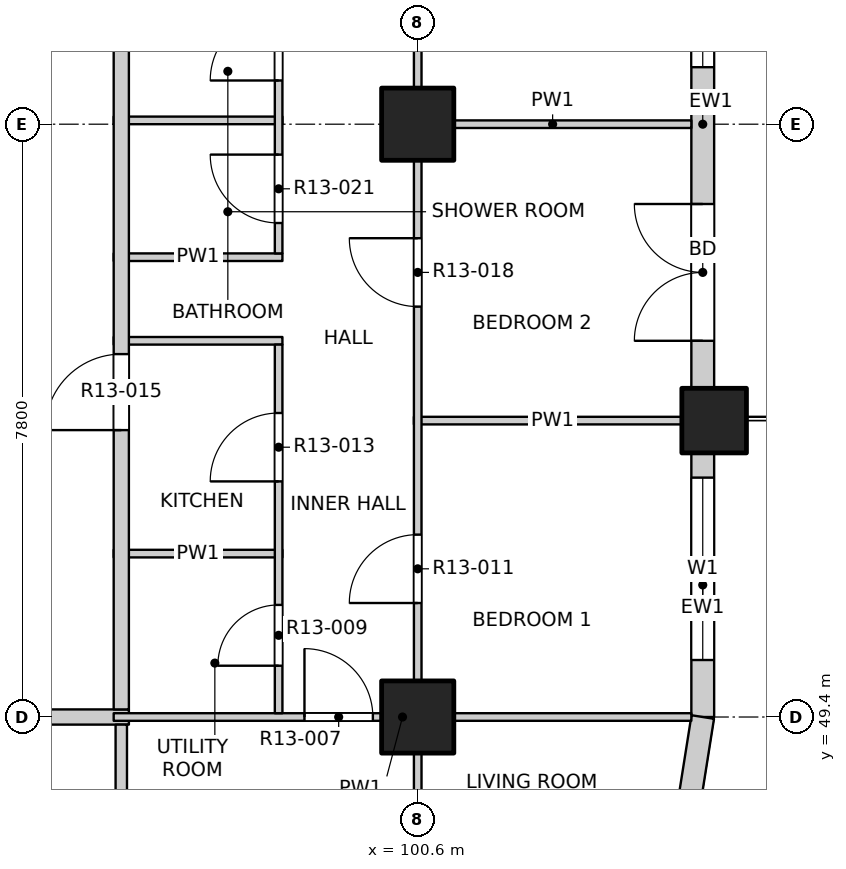
"""IFC4 building model, lengths in metres.
Left out: names, types, materials, properties, quantities, classifications, styles, units other than length and angle.
Written with IfcOpenShell. Run it as: python <this file> out.ifc"""

import sys

from ifc_helpers import new_model, si_unit, direction, frame, frame_2d, origin, origin_2d, place, context, subcontext, project, spatial, rectangle, extrude, element, fill, save


model = new_model("IFC4")
c1 = context("Model", 3, precision=1e-05, world=origin(), true_north=direction((0.0, 1.0)))
c2 = subcontext(c1, "Body", "Model", "MODEL_VIEW")
j1 = project(units=[si_unit("LENGTHUNIT", "METRE"), si_unit("PLANEANGLEUNIT", "RADIAN")], contexts=[c1])
p1 = place(None, origin())
s1 = spatial("IfcSite", under=j1, at=p1, CompositionType="ELEMENT")
p2 = place(p1, origin())
s2 = spatial("IfcBuilding", under=s1, at=p2, CompositionType="ELEMENT")
p3 = place(p2, frame((0.0, 0.0, 140.7)))
s3 = spatial("IfcBuildingStorey", under=s2, at=p3, CompositionType="ELEMENT", Elevation=140.7)
p4 = place(p3, frame((104.5, 53.3, -0.25), z_axis=(0.0, 0.0, 1.0), x_axis=(1.0, 0.0, 0.0)))
e1 = element("IfcColumn", 1, at=p4, inside=s3, PredefinedType="COLUMN", context=c2, shape_type="SweptSolid", body=[
    extrude(rectangle(XDim=0.85, YDim=0.85, at=origin_2d()), origin(), (0.0, 0.0, 1.0), 3.35),
])
for number, where, z_axis, x_axis in (
    (2, (100.6, 49.4, -0.25), (0.0, 0.0, 1.0), (1.0, 0.0, 0.0)),
    (3, (100.6, 57.2, -0.25), (0.0, 0.0, 1.0), (1.0, 0.0, 0.0)),
):
    element("IfcColumn", number, at=place(p3, frame(where, z_axis=z_axis, x_axis=x_axis)), inside=s3, PredefinedType="COLUMN", context=c2, shape_type="SweptSolid", body=[
        extrude(rectangle(XDim=0.95, YDim=0.95, at=origin_2d()), origin(), (0.0, 0.0, 1.0), 3.35),
    ])
p5 = place(p3, frame((104.35, 49.4, 0.0), z_axis=(0.0, 0.0, 1.0), x_axis=(0.0, 1.0, 0.0)))
e4 = element("IfcWall", 4, at=p5, inside=s3, PredefinedType="SOLIDWALL", context=c2, shape_type="SweptSolid", body=[
    extrude(rectangle(XDim=3.475, YDim=0.3, at=frame_2d((1.738, 0.0))), origin(), (0.0, 0.0, 1.0), 3.1),
])
p6 = place(p5, frame((0.75, 0.0, 0.9)))
e5 = element("IfcOpeningElement", 5, at=p6, cuts=e4, PredefinedType="OPENING", context=c2, shape_type="SweptSolid", body=[
    extrude(rectangle(XDim=2.4, YDim=1.8, at=frame_2d((1.2, 0.9))), frame((0.0, 0.16, 0.0), z_axis=(0.0, -1.0, 0.0), x_axis=(1.0, 0.0, 0.0)), (0.0, 0.0, 1.0), 0.32),
])
p7 = place(p3, frame((104.35, 53.725, 0.0), z_axis=(0.0, 0.0, 1.0), x_axis=(0.0, 1.0, 0.0)))
e6 = element("IfcWall", 6, at=p7, inside=s3, PredefinedType="SOLIDWALL", context=c2, shape_type="SweptSolid", body=[
    extrude(rectangle(XDim=6.95, YDim=0.3, at=frame_2d((3.475, 0.0))), origin(), (0.0, 0.0, 1.0), 3.1),
])
p8 = place(p7, frame((0.625, 0.0, 0.0)))
e7 = element("IfcOpeningElement", 7, at=p8, cuts=e6, PredefinedType="OPENING", context=c2, shape_type="SweptSolid", body=[
    extrude(rectangle(XDim=1.8, YDim=2.4, at=frame_2d((0.9, 1.2))), frame((0.0, 0.16, 0.0), z_axis=(0.0, -1.0, 0.0), x_axis=(1.0, 0.0, 0.0)), (0.0, 0.0, 1.0), 0.32),
])
p9 = place(p7, frame((4.225, 0.0, 0.9)))
e8 = element("IfcOpeningElement", 8, at=p9, cuts=e6, PredefinedType="OPENING", context=c2, shape_type="SweptSolid", body=[
    extrude(rectangle(XDim=2.4, YDim=1.8, at=frame_2d((1.2, 0.9))), frame((0.0, 0.16, 0.0), z_axis=(0.0, -1.0, 0.0), x_axis=(1.0, 0.0, 0.0)), (0.0, 0.0, 1.0), 0.32),
])
p10 = place(p3, frame((104.167, 48.241, 0.0), z_axis=(0.0, 0.0, 1.0), x_axis=(0.156496880861, 0.987678452879, 0.0)))
e9 = element("IfcWall", 9, at=p10, inside=s3, PredefinedType="SOLIDWALL", context=c2, shape_type="SweptSolid", body=[
    extrude(rectangle(XDim=1.173, YDim=0.3, at=frame_2d((0.586, 0.0))), origin(), (0.0, 0.0, 1.0), 3.1),
])
p11 = place(p3, frame((73.2, 49.4, 0.0), z_axis=(0.0, 0.0, 1.0), x_axis=(1.0, 0.0, 0.0)))
e10 = element("IfcWall", 10, at=p11, inside=s3, PredefinedType="PARTITIONING", context=c2, shape_type="SweptSolid", body=[
    extrude(rectangle(XDim=23.6, YDim=0.2, at=frame_2d((11.8, 0.0))), origin(), (0.0, 0.0, 1.0), 3.1),
])
p12 = place(p11, frame((2.225, 0.0, 0.0)))
e11 = element("IfcOpeningElement", 11, at=p12, cuts=e10, PredefinedType="OPENING", context=c2, shape_type="SweptSolid", body=[
    extrude(rectangle(XDim=1.2, YDim=2.1, at=frame_2d((0.6, 1.05))), frame((0.0, 0.11, 0.0), z_axis=(0.0, -1.0, 0.0), x_axis=(1.0, 0.0, 0.0)), (0.0, 0.0, 1.0), 0.22),
])
p13 = place(p11, frame((12.375, 0.0, 0.0)))
e12 = element("IfcOpeningElement", 12, at=p13, cuts=e10, PredefinedType="OPENING", context=c2, shape_type="SweptSolid", body=[
    extrude(rectangle(XDim=1.2, YDim=2.1, at=frame_2d((0.6, 1.05))), frame((0.0, 0.11, 0.0), z_axis=(0.0, -1.0, 0.0), x_axis=(1.0, 0.0, 0.0)), (0.0, 0.0, 1.0), 0.22),
])
p14 = place(p11, frame((20.175, 0.0, 0.0)))
e13 = element("IfcOpeningElement", 13, at=p14, cuts=e10, PredefinedType="OPENING", context=c2, shape_type="SweptSolid", body=[
    extrude(rectangle(XDim=1.2, YDim=2.1, at=frame_2d((0.6, 1.05))), frame((0.0, 0.11, 0.0), z_axis=(0.0, -1.0, 0.0), x_axis=(1.0, 0.0, 0.0)), (0.0, 0.0, 1.0), 0.22),
])
p15 = place(p3, frame((96.6, 49.4, 0.0), z_axis=(0.0, 0.0, 1.0), x_axis=(1.0, 0.0, 0.0)))
e14 = element("IfcWall", 14, at=p15, inside=s3, PredefinedType="PARTITIONING", context=c2, shape_type="SweptSolid", body=[
    extrude(rectangle(XDim=7.6, YDim=0.1, at=frame_2d((3.8, 0.0))), origin(), (0.0, 0.0, 1.0), 3.1),
])
p16 = place(p15, frame((2.51, 0.0, 0.0)))
e15 = element("IfcOpeningElement", 15, at=p16, cuts=e14, PredefinedType="OPENING", context=c2, shape_type="SweptSolid", body=[
    extrude(rectangle(XDim=0.9, YDim=2.1, at=frame_2d((0.45, 1.05))), frame((0.0, 0.06, 0.0), z_axis=(0.0, -1.0, 0.0), x_axis=(1.0, 0.0, 0.0)), (0.0, 0.0, 1.0), 0.12),
])
p17 = place(p3, frame((96.6, 51.55, 0.0), z_axis=(0.0, 0.0, 1.0), x_axis=(1.0, 0.0, 0.0)))
e16 = element("IfcWall", 16, at=p17, inside=s3, PredefinedType="PARTITIONING", context=c2, shape_type="SweptSolid", body=[
    extrude(rectangle(XDim=2.22, YDim=0.1, at=frame_2d((1.11, 0.0))), origin(), (0.0, 0.0, 1.0), 3.1),
])
p18 = place(p3, frame((100.55, 53.3, 0.0), z_axis=(0.0, 0.0, 1.0), x_axis=(1.0, 0.0, 0.0)))
e17 = element("IfcWall", 17, at=p18, inside=s3, PredefinedType="PARTITIONING", context=c2, shape_type="SweptSolid", body=[
    extrude(rectangle(XDim=3.65, YDim=0.1, at=frame_2d((1.825, 0.0))), origin(), (0.0, 0.0, 1.0), 3.1),
])
for number, where, z_axis, x_axis in (
    (18, (96.6, 54.35, 0.0), (0.0, 0.0, 1.0), (1.0, 0.0, 0.0)),
    (19, (96.6, 55.45, 0.0), (0.0, 0.0, 1.0), (1.0, 0.0, 0.0)),
):
    element("IfcWall", number, at=place(p3, frame(where, z_axis=z_axis, x_axis=x_axis)), inside=s3, PredefinedType="PARTITIONING", context=c2, shape_type="SweptSolid", body=[
        extrude(rectangle(XDim=2.22, YDim=0.1, at=frame_2d((1.11, 0.0))), origin(), (0.0, 0.0, 1.0), 3.1),
    ])
p19 = place(p3, frame((100.55, 57.2, 0.0), z_axis=(0.0, 0.0, 1.0), x_axis=(1.0, 0.0, 0.0)))
e20 = element("IfcWall", 20, at=p19, inside=s3, PredefinedType="PARTITIONING", context=c2, shape_type="SweptSolid", body=[
    extrude(rectangle(XDim=3.65, YDim=0.1, at=frame_2d((1.825, 0.0))), origin(), (0.0, 0.0, 1.0), 3.1),
])
p20 = place(p3, frame((96.6, 57.25, 0.0), z_axis=(0.0, 0.0, 1.0), x_axis=(1.0, 0.0, 0.0)))
e21 = element("IfcWall", 21, at=p20, inside=s3, PredefinedType="PARTITIONING", context=c2, shape_type="SweptSolid", body=[
    extrude(rectangle(XDim=2.22, YDim=0.1, at=frame_2d((1.11, 0.0))), origin(), (0.0, 0.0, 1.0), 3.1),
])
p21 = place(p3, frame((96.7, 45.8, 0.0), z_axis=(0.0, 0.0, 1.0), x_axis=(0.0, 1.0, 0.0)))
e22 = element("IfcWall", 22, at=p21, inside=s3, PredefinedType="PARTITIONING", context=c2, shape_type="SweptSolid", body=[
    extrude(rectangle(XDim=3.5, YDim=0.15, at=frame_2d((1.75, 0.0))), origin(), (0.0, 0.0, 1.0), 3.1),
])
p22 = place(p3, frame((96.7, 49.5, 0.0), z_axis=(0.0, 0.0, 1.0), x_axis=(0.0, 1.0, 0.0)))
e23 = element("IfcWall", 23, at=p22, inside=s3, PredefinedType="PARTITIONING", context=c2, shape_type="SweptSolid", body=[
    extrude(rectangle(XDim=34.7, YDim=0.2, at=frame_2d((17.35, 0.0))), origin(), (0.0, 0.0, 1.0), 3.1),
])
p23 = place(p22, frame((3.675, 0.0, 0.0)))
e24 = element("IfcOpeningElement", 24, at=p23, cuts=e23, PredefinedType="OPENING", context=c2, shape_type="SweptSolid", body=[
    extrude(rectangle(XDim=1.0, YDim=2.1, at=frame_2d((0.5, 1.05))), frame((0.0, 0.11, 0.0), z_axis=(0.0, -1.0, 0.0), x_axis=(1.0, 0.0, 0.0)), (0.0, 0.0, 1.0), 0.22),
])
p24 = place(p22, frame((21.725, 0.0, 0.0)))
e25 = element("IfcOpeningElement", 25, at=p24, cuts=e23, PredefinedType="OPENING", context=c2, shape_type="SweptSolid", body=[
    extrude(rectangle(XDim=1.0, YDim=2.1, at=frame_2d((0.5, 1.05))), frame((0.0, 0.11, 0.0), z_axis=(0.0, -1.0, 0.0), x_axis=(1.0, 0.0, 0.0)), (0.0, 0.0, 1.0), 0.22),
])
p25 = place(p22, frame((29.125, 0.0, 0.0)))
e26 = element("IfcOpeningElement", 26, at=p25, cuts=e23, PredefinedType="OPENING", context=c2, shape_type="SweptSolid", body=[
    extrude(rectangle(XDim=1.0, YDim=2.1, at=frame_2d((0.5, 1.05))), frame((0.0, 0.11, 0.0), z_axis=(0.0, -1.0, 0.0), x_axis=(1.0, 0.0, 0.0)), (0.0, 0.0, 1.0), 0.22),
])
p26 = place(p3, frame((98.77, 49.45, 0.0), z_axis=(0.0, 0.0, 1.0), x_axis=(0.0, 1.0, 0.0)))
e27 = element("IfcWall", 27, at=p26, inside=s3, PredefinedType="PARTITIONING", context=c2, shape_type="SweptSolid", body=[
    extrude(rectangle(XDim=4.85, YDim=0.1, at=frame_2d((2.425, 0.0))), origin(), (0.0, 0.0, 1.0), 3.1),
])
p27 = place(p26, frame((0.625, 0.0, 0.0)))
e28 = element("IfcOpeningElement", 28, at=p27, cuts=e27, PredefinedType="OPENING", context=c2, shape_type="SweptSolid", body=[
    extrude(rectangle(XDim=0.8, YDim=2.1, at=frame_2d((0.4, 1.05))), frame((0.0, 0.06, 0.0), z_axis=(0.0, -1.0, 0.0), x_axis=(1.0, 0.0, 0.0)), (0.0, 0.0, 1.0), 0.12),
])
p28 = place(p26, frame((3.05, 0.0, 0.0)))
e29 = element("IfcOpeningElement", 29, at=p28, cuts=e27, PredefinedType="OPENING", context=c2, shape_type="SweptSolid", body=[
    extrude(rectangle(XDim=0.9, YDim=2.1, at=frame_2d((0.45, 1.05))), frame((0.0, 0.06, 0.0), z_axis=(0.0, -1.0, 0.0), x_axis=(1.0, 0.0, 0.0)), (0.0, 0.0, 1.0), 0.12),
])
p29 = place(p3, frame((98.77, 55.5, 0.0), z_axis=(0.0, 0.0, 1.0), x_axis=(0.0, 1.0, 0.0)))
e30 = element("IfcWall", 30, at=p29, inside=s3, PredefinedType="PARTITIONING", context=c2, shape_type="SweptSolid", body=[
    extrude(rectangle(XDim=14.4, YDim=0.1, at=frame_2d((7.2, 0.0))), origin(), (0.0, 0.0, 1.0), 3.1),
])
p30 = place(p29, frame((0.4, 0.0, 0.0)))
e31 = element("IfcOpeningElement", 31, at=p30, cuts=e30, PredefinedType="OPENING", context=c2, shape_type="SweptSolid", body=[
    extrude(rectangle(XDim=0.9, YDim=2.1, at=frame_2d((0.45, 1.05))), frame((0.0, 0.06, 0.0), z_axis=(0.0, -1.0, 0.0), x_axis=(1.0, 0.0, 0.0)), (0.0, 0.0, 1.0), 0.12),
])
p31 = place(p29, frame((2.275, 0.0, 0.0)))
e32 = element("IfcOpeningElement", 32, at=p31, cuts=e30, PredefinedType="OPENING", context=c2, shape_type="SweptSolid", body=[
    extrude(rectangle(XDim=0.9, YDim=2.1, at=frame_2d((0.45, 1.05))), frame((0.0, 0.06, 0.0), z_axis=(0.0, -1.0, 0.0), x_axis=(1.0, 0.0, 0.0)), (0.0, 0.0, 1.0), 0.12),
])
p32 = place(p29, frame((4.25, 0.0, 0.0)))
e33 = element("IfcOpeningElement", 33, at=p32, cuts=e30, PredefinedType="OPENING", context=c2, shape_type="SweptSolid", body=[
    extrude(rectangle(XDim=0.8, YDim=2.1, at=frame_2d((0.4, 1.05))), frame((0.0, 0.06, 0.0), z_axis=(0.0, -1.0, 0.0), x_axis=(1.0, 0.0, 0.0)), (0.0, 0.0, 1.0), 0.12),
])
p33 = place(p29, frame((6.65, 0.0, 0.0)))
e34 = element("IfcOpeningElement", 34, at=p33, cuts=e30, PredefinedType="OPENING", context=c2, shape_type="SweptSolid", body=[
    extrude(rectangle(XDim=0.8, YDim=2.1, at=frame_2d((0.4, 1.05))), frame((0.0, 0.06, 0.0), z_axis=(0.0, -1.0, 0.0), x_axis=(1.0, 0.0, 0.0)), (0.0, 0.0, 1.0), 0.12),
])
p34 = place(p29, frame((9.265, 0.0, 0.0)))
e35 = element("IfcOpeningElement", 35, at=p34, cuts=e30, PredefinedType="OPENING", context=c2, shape_type="SweptSolid", body=[
    extrude(rectangle(XDim=0.9, YDim=2.1, at=frame_2d((0.45, 1.05))), frame((0.0, 0.06, 0.0), z_axis=(0.0, -1.0, 0.0), x_axis=(1.0, 0.0, 0.0)), (0.0, 0.0, 1.0), 0.12),
])
p35 = place(p29, frame((12.24, 0.0, 0.0)))
e36 = element("IfcOpeningElement", 36, at=p35, cuts=e30, PredefinedType="OPENING", context=c2, shape_type="SweptSolid", body=[
    extrude(rectangle(XDim=0.9, YDim=2.1, at=frame_2d((0.45, 1.05))), frame((0.0, 0.06, 0.0), z_axis=(0.0, -1.0, 0.0), x_axis=(1.0, 0.0, 0.0)), (0.0, 0.0, 1.0), 0.12),
])
p36 = place(p3, frame((100.6, 45.8, 0.0), z_axis=(0.0, 0.0, 1.0), x_axis=(0.0, 1.0, 0.0)))
e37 = element("IfcWall", 37, at=p36, inside=s3, PredefinedType="PARTITIONING", context=c2, shape_type="SweptSolid", body=[
    extrude(rectangle(XDim=38.4, YDim=0.1, at=frame_2d((19.2, 0.0))), origin(), (0.0, 0.0, 1.0), 3.1),
])
p37 = place(p36, frame((1.05, 0.0, 0.0)))
e38 = element("IfcOpeningElement", 38, at=p37, cuts=e37, PredefinedType="OPENING", context=c2, shape_type="SweptSolid", body=[
    extrude(rectangle(XDim=1.2, YDim=2.1, at=frame_2d((0.6, 1.05))), frame((0.0, 0.06, 0.0), z_axis=(0.0, -1.0, 0.0), x_axis=(1.0, 0.0, 0.0)), (0.0, 0.0, 1.0), 0.12),
])
p38 = place(p36, frame((5.1, 0.0, 0.0)))
e39 = element("IfcOpeningElement", 39, at=p38, cuts=e37, PredefinedType="OPENING", context=c2, shape_type="SweptSolid", body=[
    extrude(rectangle(XDim=0.9, YDim=2.1, at=frame_2d((0.45, 1.05))), frame((0.0, 0.06, 0.0), z_axis=(0.0, -1.0, 0.0), x_axis=(1.0, 0.0, 0.0)), (0.0, 0.0, 1.0), 0.12),
])
p39 = place(p36, frame((9.0, 0.0, 0.0)))
e40 = element("IfcOpeningElement", 40, at=p39, cuts=e37, PredefinedType="OPENING", context=c2, shape_type="SweptSolid", body=[
    extrude(rectangle(XDim=0.9, YDim=2.1, at=frame_2d((0.45, 1.05))), frame((0.0, 0.06, 0.0), z_axis=(0.0, -1.0, 0.0), x_axis=(1.0, 0.0, 0.0)), (0.0, 0.0, 1.0), 0.12),
])
p40 = place(p36, frame((12.9, 0.0, 0.0)))
e41 = element("IfcOpeningElement", 41, at=p40, cuts=e37, PredefinedType="OPENING", context=c2, shape_type="SweptSolid", body=[
    extrude(rectangle(XDim=0.9, YDim=2.1, at=frame_2d((0.45, 1.05))), frame((0.0, 0.06, 0.0), z_axis=(0.0, -1.0, 0.0), x_axis=(1.0, 0.0, 0.0)), (0.0, 0.0, 1.0), 0.12),
])
p41 = place(p36, frame((16.8, 0.0, 0.0)))
e42 = element("IfcOpeningElement", 42, at=p41, cuts=e37, PredefinedType="OPENING", context=c2, shape_type="SweptSolid", body=[
    extrude(rectangle(XDim=0.9, YDim=2.1, at=frame_2d((0.45, 1.05))), frame((0.0, 0.06, 0.0), z_axis=(0.0, -1.0, 0.0), x_axis=(1.0, 0.0, 0.0)), (0.0, 0.0, 1.0), 0.12),
])
p42 = place(p36, frame((20.7, 0.0, 0.0)))
e43 = element("IfcOpeningElement", 43, at=p42, cuts=e37, PredefinedType="OPENING", context=c2, shape_type="SweptSolid", body=[
    extrude(rectangle(XDim=0.9, YDim=2.1, at=frame_2d((0.45, 1.05))), frame((0.0, 0.06, 0.0), z_axis=(0.0, -1.0, 0.0), x_axis=(1.0, 0.0, 0.0)), (0.0, 0.0, 1.0), 0.12),
])
p43 = place(p36, frame((24.6, 0.0, 0.0)))
e44 = element("IfcOpeningElement", 44, at=p43, cuts=e37, PredefinedType="OPENING", context=c2, shape_type="SweptSolid", body=[
    extrude(rectangle(XDim=0.9, YDim=2.1, at=frame_2d((0.45, 1.05))), frame((0.0, 0.06, 0.0), z_axis=(0.0, -1.0, 0.0), x_axis=(1.0, 0.0, 0.0)), (0.0, 0.0, 1.0), 0.12),
])
p44 = place(p36, frame((28.5, 0.0, 0.0)))
e45 = element("IfcOpeningElement", 45, at=p44, cuts=e37, PredefinedType="OPENING", context=c2, shape_type="SweptSolid", body=[
    extrude(rectangle(XDim=0.9, YDim=2.1, at=frame_2d((0.45, 1.05))), frame((0.0, 0.06, 0.0), z_axis=(0.0, -1.0, 0.0), x_axis=(1.0, 0.0, 0.0)), (0.0, 0.0, 1.0), 0.12),
])
p45 = place(p36, frame((32.4, 0.0, 0.0)))
e46 = element("IfcOpeningElement", 46, at=p45, cuts=e37, PredefinedType="OPENING", context=c2, shape_type="SweptSolid", body=[
    extrude(rectangle(XDim=0.9, YDim=2.1, at=frame_2d((0.45, 1.05))), frame((0.0, 0.06, 0.0), z_axis=(0.0, -1.0, 0.0), x_axis=(1.0, 0.0, 0.0)), (0.0, 0.0, 1.0), 0.12),
])
p46 = place(p36, frame((36.15, 0.0, 0.0)))
e47 = element("IfcOpeningElement", 47, at=p46, cuts=e37, PredefinedType="OPENING", context=c2, shape_type="SweptSolid", body=[
    extrude(rectangle(XDim=1.2, YDim=2.1, at=frame_2d((0.6, 1.05))), frame((0.0, 0.06, 0.0), z_axis=(0.0, -1.0, 0.0), x_axis=(1.0, 0.0, 0.0)), (0.0, 0.0, 1.0), 0.12),
])
p47 = place(p6, origin())
e48 = element("IfcWindow", 48, at=p47, inside=s3, PartitioningType="DOUBLE_PANEL_VERTICAL", PredefinedType="WINDOW", context=c2, shape_type="SweptSolid", body=[
    extrude(rectangle(XDim=2.4, YDim=1.8, at=frame_2d((1.2, 0.9))), frame((0.0, 0.03, 0.0), z_axis=(0.0, -1.0, 0.0), x_axis=(1.0, 0.0, 0.0)), (0.0, 0.0, 1.0), 0.06),
])
fill(e5, e48)
p48 = place(p8, origin())
e49 = element("IfcDoor", 49, at=p48, inside=s3, OperationType="DOUBLE_DOOR_SINGLE_SWING", PredefinedType="DOOR", context=c2, shape_type="SweptSolid", body=[
    extrude(rectangle(XDim=1.8, YDim=2.4, at=frame_2d((0.9, 1.2))), frame((0.0, 0.025, 0.0), z_axis=(0.0, -1.0, 0.0), x_axis=(1.0, 0.0, 0.0)), (0.0, 0.0, 1.0), 0.05),
])
fill(e7, e49)
p49 = place(p9, origin())
e50 = element("IfcWindow", 50, at=p49, inside=s3, PartitioningType="DOUBLE_PANEL_VERTICAL", PredefinedType="WINDOW", context=c2, shape_type="SweptSolid", body=[
    extrude(rectangle(XDim=2.4, YDim=1.8, at=frame_2d((1.2, 0.9))), frame((0.0, 0.03, 0.0), z_axis=(0.0, -1.0, 0.0), x_axis=(1.0, 0.0, 0.0)), (0.0, 0.0, 1.0), 0.06),
])
fill(e8, e50)
p50 = place(p16, origin())
e51 = element("IfcDoor", 51, at=p50, inside=s3, OperationType="SINGLE_SWING_LEFT", PredefinedType="DOOR", context=c2, shape_type="SweptSolid", body=[
    extrude(rectangle(XDim=0.9, YDim=2.1, at=frame_2d((0.45, 1.05))), frame((0.0, 0.025, 0.0), z_axis=(0.0, -1.0, 0.0), x_axis=(1.0, 0.0, 0.0)), (0.0, 0.0, 1.0), 0.05),
])
fill(e15, e51)
p51 = place(p27, origin())
e52 = element("IfcDoor", 52, at=p51, inside=s3, OperationType="SINGLE_SWING_LEFT", PredefinedType="DOOR", context=c2, shape_type="SweptSolid", body=[
    extrude(rectangle(XDim=0.8, YDim=2.1, at=frame_2d((0.4, 1.05))), frame((0.0, 0.025, 0.0), z_axis=(0.0, -1.0, 0.0), x_axis=(1.0, 0.0, 0.0)), (0.0, 0.0, 1.0), 0.05),
])
fill(e28, e52)
p52 = place(p38, origin())
e53 = element("IfcDoor", 53, at=p52, inside=s3, OperationType="SINGLE_SWING_LEFT", PredefinedType="DOOR", context=c2, shape_type="SweptSolid", body=[
    extrude(rectangle(XDim=0.9, YDim=2.1, at=frame_2d((0.45, 1.05))), frame((0.0, 0.025, 0.0), z_axis=(0.0, -1.0, 0.0), x_axis=(1.0, 0.0, 0.0)), (0.0, 0.0, 1.0), 0.05),
])
fill(e39, e53)
p53 = place(p28, origin())
e54 = element("IfcDoor", 54, at=p53, inside=s3, OperationType="SINGLE_SWING_LEFT", PredefinedType="DOOR", context=c2, shape_type="SweptSolid", body=[
    extrude(rectangle(XDim=0.9, YDim=2.1, at=frame_2d((0.45, 1.05))), frame((0.0, 0.025, 0.0), z_axis=(0.0, -1.0, 0.0), x_axis=(1.0, 0.0, 0.0)), (0.0, 0.0, 1.0), 0.05),
])
fill(e29, e54)
p54 = place(p23, origin())
e55 = element("IfcDoor", 55, at=p54, inside=s3, OperationType="SINGLE_SWING_RIGHT", PredefinedType="DOOR", context=c2, shape_type="SweptSolid", body=[
    extrude(rectangle(XDim=1.0, YDim=2.1, at=frame_2d((0.5, 1.05))), frame((0.0, 0.025, 0.0), z_axis=(0.0, -1.0, 0.0), x_axis=(1.0, 0.0, 0.0)), (0.0, 0.0, 1.0), 0.05),
])
fill(e24, e55)
p55 = place(p39, origin())
e56 = element("IfcDoor", 56, at=p55, inside=s3, OperationType="SINGLE_SWING_RIGHT", PredefinedType="DOOR", context=c2, shape_type="SweptSolid", body=[
    extrude(rectangle(XDim=0.9, YDim=2.1, at=frame_2d((0.45, 1.05))), frame((0.0, 0.025, 0.0), z_axis=(0.0, -1.0, 0.0), x_axis=(1.0, 0.0, 0.0)), (0.0, 0.0, 1.0), 0.05),
])
fill(e40, e56)
p56 = place(p30, origin())
e57 = element("IfcDoor", 57, at=p56, inside=s3, OperationType="SINGLE_SWING_RIGHT", PredefinedType="DOOR", context=c2, shape_type="SweptSolid", body=[
    extrude(rectangle(XDim=0.9, YDim=2.1, at=frame_2d((0.45, 1.05))), frame((0.0, 0.025, 0.0), z_axis=(0.0, -1.0, 0.0), x_axis=(1.0, 0.0, 0.0)), (0.0, 0.0, 1.0), 0.05),
])
fill(e31, e57)
p57 = place(p31, origin())
e58 = element("IfcDoor", 58, at=p57, inside=s3, OperationType="SINGLE_SWING_LEFT", PredefinedType="DOOR", context=c2, shape_type="SweptSolid", body=[
    extrude(rectangle(XDim=0.9, YDim=2.1, at=frame_2d((0.45, 1.05))), frame((0.0, 0.025, 0.0), z_axis=(0.0, -1.0, 0.0), x_axis=(1.0, 0.0, 0.0)), (0.0, 0.0, 1.0), 0.05),
])
fill(e32, e58)
save(model, sys.argv[1])
